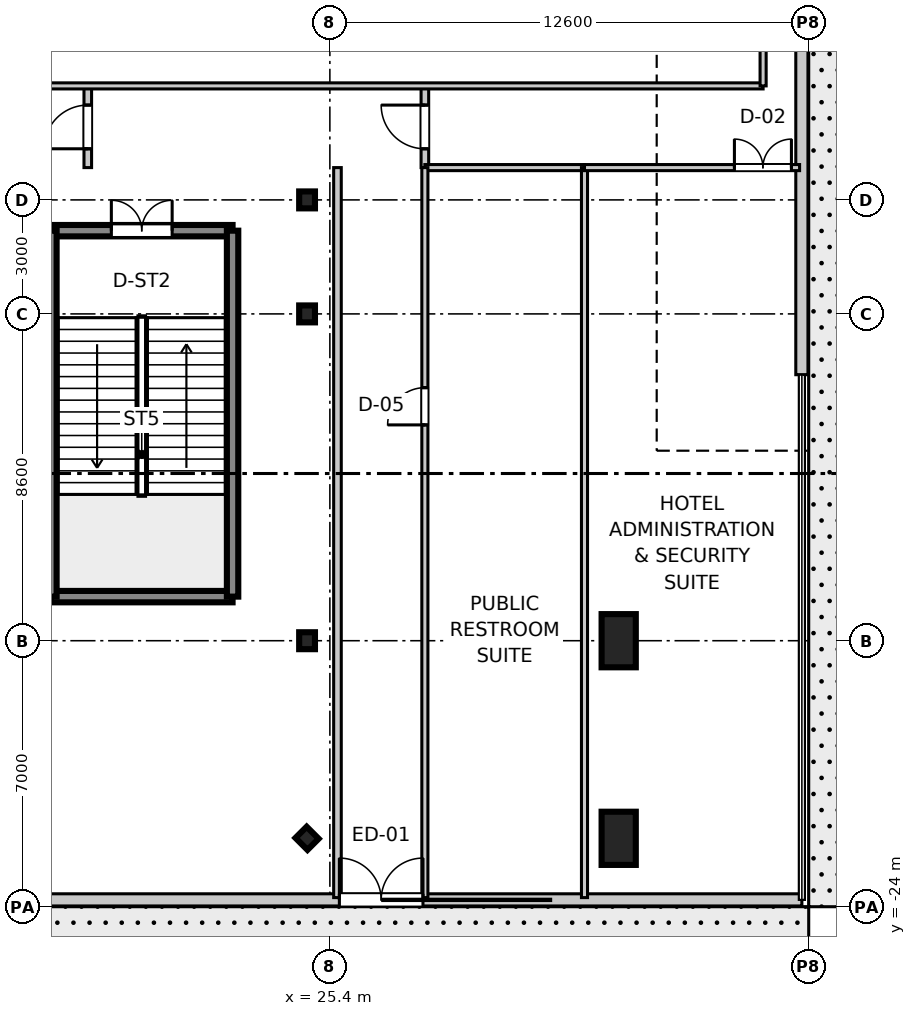
"""IFC4 building model, lengths in metres.
Left out: names, types, materials, properties, quantities, classifications, styles, units other than length and angle.
Written with IfcOpenShell. Run it as: python <this file> out.ifc"""

import sys

from ifc_helpers import new_model, si_unit, direction, frame, frame_2d, origin, origin_2d, place, context, subcontext, project, spatial, rectangle, i_section, extrude, source, transform, mapped, element, fill, save


model = new_model("IFC4")
c1 = context("Model", 3, precision=1e-05, world=origin(), true_north=direction((0.0, 1.0)))
c2 = subcontext(c1, "Body", "Model", "MODEL_VIEW")
j1 = project(units=[si_unit("LENGTHUNIT", "METRE"), si_unit("PLANEANGLEUNIT", "RADIAN")], contexts=[c1])
p1 = place(None, origin())
s1 = spatial("IfcSite", under=j1, at=p1, CompositionType="ELEMENT")
p2 = place(p1, origin())
s2 = spatial("IfcBuilding", under=s1, at=p2, CompositionType="ELEMENT")
p3 = place(p2, origin())
s3 = spatial("IfcBuildingStorey", under=s2, at=p3, CompositionType="ELEMENT", Elevation=0.0)
m1 = source(origin(), c2, "Body", "SweptSolid", [
    extrude(rectangle(XDim=0.9, YDim=1.4, at=origin_2d()), origin(), (0.0, 0.0, 1.0), 5.355),
])
for number, where, z_axis, x_axis in (
    (1, (33.0, -22.2, 0.0), (0.0, 0.0, 1.0), (1.0, 0.0, 0.0)),
    (2, (33.0, -17.0, 0.0), (0.0, 0.0, 1.0), (1.0, 0.0, 0.0)),
):
    element("IfcColumn", number, at=place(p3, frame(where, z_axis=z_axis, x_axis=x_axis)), inside=s3, PredefinedType="PILASTER", context=c2, shape_type="MappedRepresentation", body=[
        mapped(m1, transform((0.0, 0.0, 0.0), scale=1.0)),
    ])
m2 = source(origin(), c2, "Body", "SweptSolid", [
    extrude(i_section(OverallWidth=0.416, OverallDepth=0.446, WebThickness=0.025, FlangeThickness=0.04, at=origin_2d()), origin(), (0.0, 0.0, 1.0), 5.355),
])
for number, where, z_axis, x_axis in (
    (3, (24.8, -17.0, 0.0), (0.0, 0.0, 1.0), (1.0, 0.0, 0.0)),
    (4, (24.8, -8.4, 0.0), (0.0, 0.0, 1.0), (1.0, 0.0, 0.0)),
    (5, (24.8, -5.4, 0.0), (0.0, 0.0, 1.0), (1.0, 0.0, 0.0)),
    (6, (24.8, -22.2, 0.0), (0.0, 0.0, 1.0), (0.707, 0.707, 0.0)),
):
    element("IfcColumn", number, at=place(p3, frame(where, z_axis=z_axis, x_axis=x_axis)), inside=s3, PredefinedType="COLUMN", context=c2, shape_type="MappedRepresentation", body=[
        mapped(m2, transform((0.0, 0.0, 0.0), scale=1.0)),
    ])
m3 = source(origin(), c2, "Body", "SweptSolid", [
    extrude(rectangle(XDim=4.78, YDim=0.3, at=frame_2d((2.39, 0.0))), origin(), (0.0, 0.0, 1.0), 5.08),
])
p4 = place(p3, frame((18.06, -15.84, 0.0), z_axis=(0.0, 0.0, 1.0), x_axis=(1.0, 0.0, 0.0)))
e7 = element("IfcWall", 7, at=p4, inside=s3, PredefinedType="SHEAR", context=c2, shape_type="MappedRepresentation", body=[
    mapped(m3, transform((0.0, 0.0, 0.0), scale=1.0)),
])
p5 = place(p3, frame((18.06, -6.21, 0.0), z_axis=(0.0, 0.0, 1.0), x_axis=(1.0, 0.0, 0.0)))
e8 = element("IfcWall", 8, at=p5, inside=s3, PredefinedType="SHEAR", context=c2, shape_type="MappedRepresentation", body=[
    mapped(m3, transform((0.0, 0.0, 0.0), scale=1.0)),
])
p6 = place(p5, frame((1.59, 0.0, 0.0)))
e9 = element("IfcOpeningElement", 9, at=p6, cuts=e8, PredefinedType="OPENING", context=c2, shape_type="SweptSolid", body=[
    extrude(rectangle(XDim=1.6, YDim=2.2, at=frame_2d((0.8, 1.1))), frame((0.0, 0.16, 0.0), z_axis=(0.0, -1.0, 0.0), x_axis=(1.0, 0.0, 0.0)), (0.0, 0.0, 1.0), 0.32),
])
m4 = source(origin(), c2, "Body", "SweptSolid", [
    extrude(rectangle(XDim=9.63, YDim=0.3, at=frame_2d((4.815, 0.0))), origin(), (0.0, 0.0, 1.0), 5.08),
])
for number, where, z_axis, x_axis in (
    (10, (18.06, -15.84, 0.0), (0.0, 0.0, 1.0), (0.0, 1.0, 0.0)),
    (11, (22.84, -15.84, 0.0), (0.0, 0.0, 1.0), (0.0, 1.0, 0.0)),
):
    element("IfcWall", number, at=place(p3, frame(where, z_axis=z_axis, x_axis=x_axis)), inside=s3, PredefinedType="SHEAR", context=c2, shape_type="MappedRepresentation", body=[
        mapped(m4, transform((0.0, 0.0, 0.0), scale=1.0)),
    ])
m5 = source(origin(), c2, "Body", "SweptSolid", [
    extrude(rectangle(XDim=23.82, YDim=0.32, at=frame_2d((11.91, 0.0))), origin(), (0.0, 0.0, 1.0), 5.08),
])
p7 = place(p3, frame((14.0, -23.82, 0.0), z_axis=(0.0, 0.0, 1.0), x_axis=(1.0, 0.0, 0.0)))
e12 = element("IfcWall", 12, at=p7, inside=s3, PredefinedType="STANDARD", context=c2, shape_type="MappedRepresentation", body=[
    mapped(m5, transform((0.0, 0.0, 0.0), scale=1.0)),
])
p8 = place(p7, frame((11.65, 0.0, 0.0)))
e13 = element("IfcOpeningElement", 13, at=p8, cuts=e12, PredefinedType="OPENING", context=c2, shape_type="SweptSolid", body=[
    extrude(rectangle(XDim=2.2, YDim=2.6, at=frame_2d((1.1, 1.3))), frame((0.0, 0.17, 0.0), z_axis=(0.0, -1.0, 0.0), x_axis=(1.0, 0.0, 0.0)), (0.0, 0.0, 1.0), 0.34),
])
m6 = source(origin(), c2, "Body", "SweptSolid", [
    extrude(rectangle(XDim=20.0, YDim=0.32, at=frame_2d((10.0, 0.0))), origin(), (0.0, 0.0, 1.0), 5.08),
])
p9 = place(p3, frame((37.82, -10.0, 0.0), z_axis=(0.0, 0.0, 1.0), x_axis=(0.0, 1.0, 0.0)))
e14 = element("IfcWall", 14, at=p9, inside=s3, PredefinedType="STANDARD", context=c2, shape_type="MappedRepresentation", body=[
    mapped(m6, transform((0.0, 0.0, 0.0), scale=1.0)),
])
p10 = place(p9, frame((8.9, 0.0, 0.0)))
e15 = element("IfcOpeningElement", 15, at=p10, cuts=e14, PredefinedType="OPENING", context=c2, shape_type="SweptSolid", body=[
    extrude(rectangle(XDim=2.2, YDim=2.6, at=frame_2d((1.1, 1.3))), frame((0.0, 0.17, 0.0), z_axis=(0.0, -1.0, 0.0), x_axis=(1.0, 0.0, 0.0)), (0.0, 0.0, 1.0), 0.34),
])
m7 = source(origin(), c2, "Body", "SweptSolid", [
    extrude(rectangle(XDim=2.15, YDim=0.2, at=frame_2d((1.075, 0.0))), origin(), (0.0, 0.0, 1.0), 3.4),
])
p11 = place(p3, frame((19.03, -4.55, 0.0), z_axis=(0.0, 0.0, 1.0), x_axis=(0.0, 1.0, 0.0)))
e16 = element("IfcWall", 16, at=p11, inside=s3, PredefinedType="PARTITIONING", context=c2, shape_type="MappedRepresentation", body=[
    mapped(m7, transform((0.0, 0.0, 0.0), scale=1.0)),
])
p12 = place(p11, frame((0.495, 0.0, 0.0)))
e17 = element("IfcOpeningElement", 17, at=p12, cuts=e16, PredefinedType="OPENING", context=c2, shape_type="SweptSolid", body=[
    extrude(rectangle(XDim=1.15, YDim=2.15, at=frame_2d((0.575, 1.075))), frame((0.0, 0.11, 0.0), z_axis=(0.0, -1.0, 0.0), x_axis=(1.0, 0.0, 0.0)), (0.0, 0.0, 1.0), 0.22),
])
m8 = source(origin(), c2, "Body", "SweptSolid", [
    extrude(rectangle(XDim=19.21, YDim=0.2, at=frame_2d((9.605, 0.0))), origin(), (0.0, 0.0, 1.0), 3.4),
])
p13 = place(p3, frame((25.6, -23.76, 0.0), z_axis=(0.0, 0.0, 1.0), x_axis=(0.0, 1.0, 0.0)))
e18 = element("IfcWall", 18, at=p13, inside=s3, PredefinedType="PARTITIONING", context=c2, shape_type="MappedRepresentation", body=[
    mapped(m8, transform((0.0, 0.0, 0.0), scale=1.0)),
])
p14 = place(p3, frame((27.9, -4.55, 0.0), z_axis=(0.0, 0.0, 1.0), x_axis=(0.0, 1.0, 0.0)))
e19 = element("IfcWall", 19, at=p14, inside=s3, PredefinedType="PARTITIONING", context=c2, shape_type="MappedRepresentation", body=[
    mapped(m7, transform((0.0, 0.0, 0.0), scale=1.0)),
])
p15 = place(p14, frame((0.495, 0.0, 0.0)))
e20 = element("IfcOpeningElement", 20, at=p15, cuts=e19, PredefinedType="OPENING", context=c2, shape_type="SweptSolid", body=[
    extrude(rectangle(XDim=1.15, YDim=2.15, at=frame_2d((0.575, 1.075))), frame((0.0, 0.11, 0.0), z_axis=(0.0, -1.0, 0.0), x_axis=(1.0, 0.0, 0.0)), (0.0, 0.0, 1.0), 0.22),
])
m9 = source(origin(), c2, "Body", "SweptSolid", [
    extrude(rectangle(XDim=20.15, YDim=0.16, at=frame_2d((10.075, 0.0))), origin(), (0.0, 0.0, 1.0), 3.4),
])
p16 = place(p3, frame((16.65, -2.4, 0.0), z_axis=(0.0, 0.0, 1.0), x_axis=(1.0, 0.0, 0.0)))
e21 = element("IfcWall", 21, at=p16, inside=s3, PredefinedType="PARTITIONING", context=c2, shape_type="MappedRepresentation", body=[
    mapped(m9, transform((0.0, 0.0, 0.0), scale=1.0)),
])
m10 = source(origin(), c2, "Body", "SweptSolid", [
    extrude(rectangle(XDim=4.8, YDim=0.16, at=frame_2d((2.4, 0.0))), origin(), (0.0, 0.0, 1.0), 3.4),
])
p17 = place(p3, frame((36.8, -2.4, 0.0), z_axis=(0.0, 0.0, 1.0), x_axis=(0.0, 1.0, 0.0)))
e22 = element("IfcWall", 22, at=p17, inside=s3, PredefinedType="PARTITIONING", context=c2, shape_type="MappedRepresentation", body=[
    mapped(m10, transform((0.0, 0.0, 0.0), scale=1.0)),
])
m11 = source(origin(), c2, "Body", "SweptSolid", [
    extrude(rectangle(XDim=4.2, YDim=0.16, at=frame_2d((2.1, 0.0))), origin(), (0.0, 0.0, 1.0), 3.4),
])
p18 = place(p3, frame((27.9, -4.55, 0.0), z_axis=(0.0, 0.0, 1.0), x_axis=(1.0, 0.0, 0.0)))
e23 = element("IfcWall", 23, at=p18, inside=s3, PredefinedType="PARTITIONING", context=c2, shape_type="MappedRepresentation", body=[
    mapped(m11, transform((0.0, 0.0, 0.0), scale=1.0)),
])
m12 = source(origin(), c2, "Body", "SweptSolid", [
    extrude(rectangle(XDim=19.21, YDim=0.16, at=frame_2d((9.605, 0.0))), origin(), (0.0, 0.0, 1.0), 3.4),
])
p19 = place(p3, frame((27.9, -23.76, 0.0), z_axis=(0.0, 0.0, 1.0), x_axis=(0.0, 1.0, 0.0)))
e24 = element("IfcWall", 24, at=p19, inside=s3, PredefinedType="PARTITIONING", context=c2, shape_type="MappedRepresentation", body=[
    mapped(m12, transform((0.0, 0.0, 0.0), scale=1.0)),
])
p20 = place(p19, frame((12.439, 0.0, 0.0)))
e25 = element("IfcOpeningElement", 25, at=p20, cuts=e24, PredefinedType="OPENING", context=c2, shape_type="SweptSolid", body=[
    extrude(rectangle(XDim=0.98, YDim=2.1, at=frame_2d((0.49, 1.05))), frame((0.0, 0.09, 0.0), z_axis=(0.0, -1.0, 0.0), x_axis=(1.0, 0.0, 0.0)), (0.0, 0.0, 1.0), 0.18),
])
p21 = place(p3, frame((32.1, -23.76, 0.0), z_axis=(0.0, 0.0, 1.0), x_axis=(0.0, 1.0, 0.0)))
e26 = element("IfcWall", 26, at=p21, inside=s3, PredefinedType="PARTITIONING", context=c2, shape_type="MappedRepresentation", body=[
    mapped(m12, transform((0.0, 0.0, 0.0), scale=1.0)),
])
m13 = source(origin(), c2, "Body", "SweptSolid", [
    extrude(rectangle(XDim=5.66, YDim=0.16, at=frame_2d((2.83, 0.0))), origin(), (0.0, 0.0, 1.0), 3.4),
])
p22 = place(p3, frame((32.1, -4.55, 0.0), z_axis=(0.0, 0.0, 1.0), x_axis=(1.0, 0.0, 0.0)))
e27 = element("IfcWall", 27, at=p22, inside=s3, PredefinedType="PARTITIONING", context=c2, shape_type="MappedRepresentation", body=[
    mapped(m13, transform((0.0, 0.0, 0.0), scale=1.0)),
])
p23 = place(p22, frame((3.945, 0.0, 0.0)))
e28 = element("IfcOpeningElement", 28, at=p23, cuts=e27, PredefinedType="OPENING", context=c2, shape_type="SweptSolid", body=[
    extrude(rectangle(XDim=1.5, YDim=2.15, at=frame_2d((0.75, 1.075))), frame((0.0, 0.09, 0.0), z_axis=(0.0, -1.0, 0.0), x_axis=(1.0, 0.0, 0.0)), (0.0, 0.0, 1.0), 0.18),
])
m14 = source(origin(), c2, "Body", "SweptSolid", [
    extrude(rectangle(XDim=1.6, YDim=2.2, at=frame_2d((0.8, 1.1))), frame((0.0, 0.025, 0.0), z_axis=(0.0, -1.0, 0.0), x_axis=(1.0, 0.0, 0.0)), (0.0, 0.0, 1.0), 0.05),
])
p24 = place(p6, origin())
e29 = element("IfcDoor", 29, at=p24, inside=s3, OperationType="DOUBLE_DOOR_SINGLE_SWING", PredefinedType="DOOR", context=c2, shape_type="MappedRepresentation", body=[
    mapped(m14, transform((0.0, 0.0, 0.0), scale=1.0)),
])
fill(e9, e29)
m15 = source(origin(), c2, "Body", "SweptSolid", [
    extrude(rectangle(XDim=2.2, YDim=2.6, at=frame_2d((1.1, 1.3))), frame((0.0, 0.025, 0.0), z_axis=(0.0, -1.0, 0.0), x_axis=(1.0, 0.0, 0.0)), (0.0, 0.0, 1.0), 0.05),
])
p25 = place(p8, frame((2.2, 0.0, 0.0), z_axis=(0.0, 0.0, 1.0), x_axis=(-1.0, 0.0, 0.0)))
e30 = element("IfcDoor", 30, at=p25, inside=s3, OperationType="DOUBLE_DOOR_SINGLE_SWING", PredefinedType="DOOR", context=c2, shape_type="MappedRepresentation", body=[
    mapped(m15, transform((0.0, 0.0, 0.0), scale=1.0)),
])
fill(e13, e30)
m16 = source(origin(), c2, "Body", "SweptSolid", [
    extrude(rectangle(XDim=1.15, YDim=2.15, at=frame_2d((0.575, 1.075))), frame((0.0, 0.025, 0.0), z_axis=(0.0, -1.0, 0.0), x_axis=(1.0, 0.0, 0.0)), (0.0, 0.0, 1.0), 0.05),
])
p26 = place(p12, frame((1.15, 0.0, 0.0), z_axis=(0.0, 0.0, 1.0), x_axis=(-1.0, 0.0, 0.0)))
e31 = element("IfcDoor", 31, at=p26, inside=s3, OperationType="SINGLE_SWING_LEFT", PredefinedType="DOOR", context=c2, shape_type="MappedRepresentation", body=[
    mapped(m16, transform((0.0, 0.0, 0.0), scale=1.0)),
])
fill(e17, e31)
p27 = place(p15, origin())
e32 = element("IfcDoor", 32, at=p27, inside=s3, OperationType="SINGLE_SWING_RIGHT", PredefinedType="DOOR", context=c2, shape_type="MappedRepresentation", body=[
    mapped(m16, transform((0.0, 0.0, 0.0), scale=1.0)),
])
fill(e20, e32)
m17 = source(origin(), c2, "Body", "SweptSolid", [
    extrude(rectangle(XDim=0.98, YDim=2.1, at=frame_2d((0.49, 1.05))), frame((0.0, 0.025, 0.0), z_axis=(0.0, -1.0, 0.0), x_axis=(1.0, 0.0, 0.0)), (0.0, 0.0, 1.0), 0.05),
])
p28 = place(p20, frame((0.98, 0.0, 0.0), z_axis=(0.0, 0.0, 1.0), x_axis=(-1.0, 0.0, 0.0)))
e33 = element("IfcDoor", 33, at=p28, inside=s3, OperationType="SINGLE_SWING_LEFT", PredefinedType="DOOR", context=c2, shape_type="MappedRepresentation", body=[
    mapped(m17, transform((0.0, 0.0, 0.0), scale=1.0)),
])
fill(e25, e33)
m18 = source(origin(), c2, "Body", "SweptSolid", [
    extrude(rectangle(XDim=1.5, YDim=2.15, at=frame_2d((0.75, 1.075))), frame((0.0, 0.025, 0.0), z_axis=(0.0, -1.0, 0.0), x_axis=(1.0, 0.0, 0.0)), (0.0, 0.0, 1.0), 0.05),
])
p29 = place(p23, frame((1.5, 0.0, 0.0), z_axis=(0.0, 0.0, 1.0), x_axis=(-1.0, 0.0, 0.0)))
e34 = element("IfcDoor", 34, at=p29, inside=s3, OperationType="DOUBLE_DOOR_SINGLE_SWING", PredefinedType="DOOR", context=c2, shape_type="MappedRepresentation", body=[
    mapped(m18, transform((0.0, 0.0, 0.0), scale=1.0)),
])
fill(e28, e34)
save(model, sys.argv[1])
